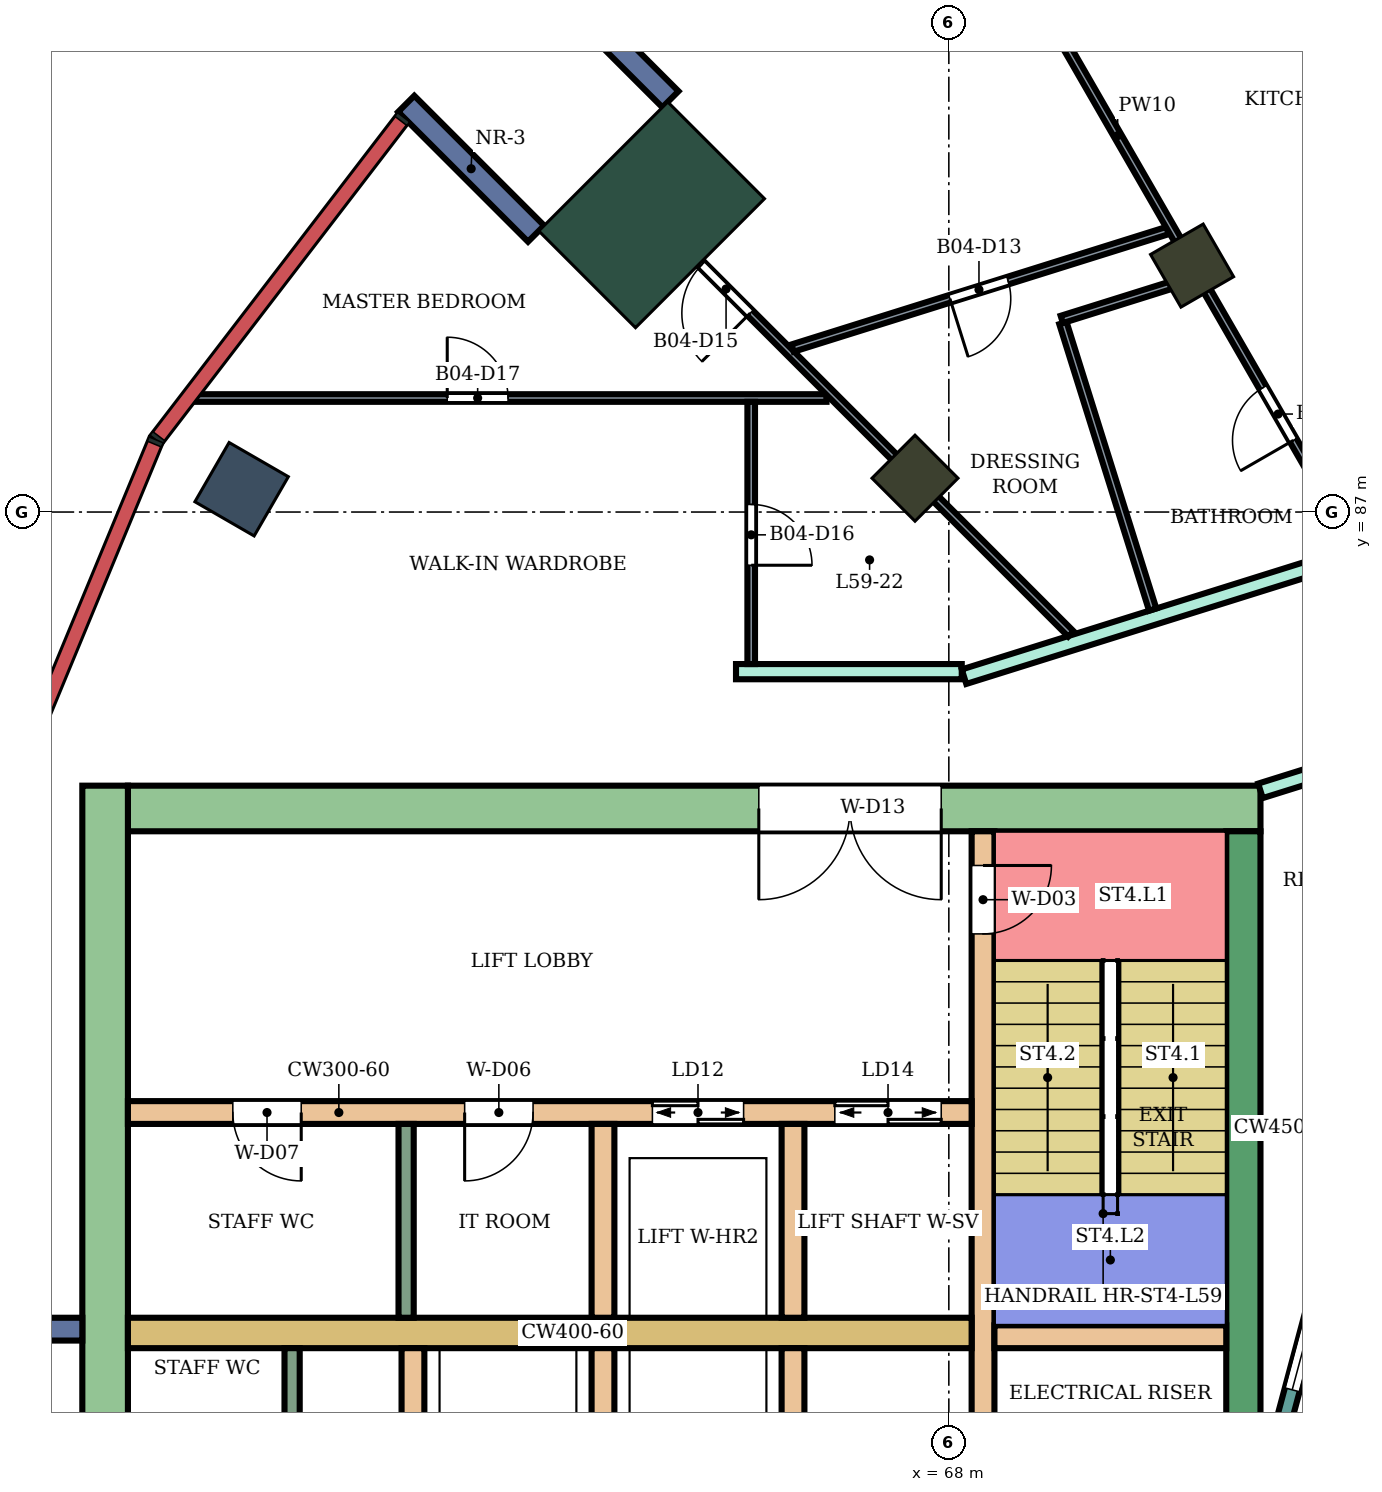
"""IFC4 building model, lengths in metres.
Left out: names, types, materials, properties, quantities, classifications, styles, units other than length and angle.
Written with IfcOpenShell. Run it as: python <this file> out.ifc"""

import sys

from ifc_helpers import new_model, si_unit, direction, frame, frame_2d, origin, origin_2d, place, context, subcontext, project, spatial, rectangle, extrude, element, fill, save


model = new_model("IFC4")
c1 = context("Model", 3, precision=1e-05, world=origin(), true_north=direction((0.0, 1.0)))
c2 = subcontext(c1, "Body", "Model", "MODEL_VIEW")
j1 = project(units=[si_unit("LENGTHUNIT", "METRE"), si_unit("PLANEANGLEUNIT", "RADIAN")], contexts=[c1])
p1 = place(None, origin())
s1 = spatial("IfcSite", under=j1, at=p1, CompositionType="ELEMENT")
p2 = place(p1, origin())
s2 = spatial("IfcBuilding", under=s1, at=p2, CompositionType="ELEMENT")
p3 = place(p2, frame((0.0, 0.0, 258.3)))
s3 = spatial("IfcBuildingStorey", under=s2, at=p3, CompositionType="ELEMENT", Elevation=258.3)
p4 = place(p3, frame((58.696, 87.3, 0.0), z_axis=(0.0, 0.0, 1.0), x_axis=(-0.866025403784, 0.5, 0.0)))
e1 = element("IfcColumn", 1, at=p4, inside=s3, PredefinedType="COLUMN", context=c2, shape_type="SweptSolid", body=[
    extrude(rectangle(XDim=0.9, YDim=0.9, at=origin_2d()), origin(), (0.0, 0.0, 1.0), 4.2),
])
for number, where, z_axis, x_axis in (
    (2, (71.2, 90.242, 0.0), (0.0, 0.0, 1.0), (-0.5, 0.866, 0.0)),
    (3, (67.555, 87.445, 0.0), (0.0, 0.0, 1.0), (-0.707, 0.707, 0.0)),
):
    element("IfcColumn", number, at=place(p3, frame(where, z_axis=z_axis, x_axis=x_axis)), inside=s3, PredefinedType="COLUMN", context=c2, shape_type="SweptSolid", body=[
        extrude(rectangle(XDim=0.8, YDim=0.8, at=origin_2d()), origin(), (0.0, 0.0, 1.0), 4.2),
    ])
p5 = place(p3, frame((64.09, 90.91, 0.0), z_axis=(0.0, 0.0, 1.0), x_axis=(-0.707106781187, 0.707106781187, 0.0)))
e4 = element("IfcColumn", 4, at=p5, inside=s3, PredefinedType="COLUMN", context=c2, shape_type="SweptSolid", body=[
    extrude(rectangle(XDim=1.8, YDim=2.4, at=origin_2d()), origin(), (0.0, 0.0, 1.0), 4.2),
])
p6 = place(p3, frame((72.1, 83.1, 0.0), z_axis=(0.0, 0.0, 1.0), x_axis=(-1.0, 0.0, 0.0)))
e5 = element("IfcWall", 5, at=p6, inside=s3, PredefinedType="SHEAR", context=c2, shape_type="SweptSolid", body=[
    extrude(rectangle(XDim=14.9, YDim=0.6, at=frame_2d((7.45, 0.0))), origin(), (0.0, 0.0, 1.0), 3.88),
])
p7 = place(p6, frame((4.2, 0.0, 0.0)))
e6 = element("IfcOpeningElement", 6, at=p7, cuts=e5, PredefinedType="OPENING", context=c2, shape_type="SweptSolid", body=[
    extrude(rectangle(XDim=2.4, YDim=2.4, at=frame_2d((1.2, 1.2))), frame((0.0, 0.31, 0.0), z_axis=(0.0, -1.0, 0.0), x_axis=(1.0, 0.0, 0.0)), (0.0, 0.0, 1.0), 0.62),
])
p8 = place(p3, frame((71.875, 82.8, 0.0), z_axis=(0.0, 0.0, 1.0), x_axis=(0.0, -1.0, 0.0)))
e7 = element("IfcWall", 7, at=p8, inside=s3, PredefinedType="SHEAR", context=c2, shape_type="SweptSolid", body=[
    extrude(rectangle(XDim=7.8, YDim=0.45, at=frame_2d((3.9, 0.0))), origin(), (0.0, 0.0, 1.0), 3.88),
])
p9 = place(p3, frame((56.9, 83.4, 0.0), z_axis=(0.0, 0.0, 1.0), x_axis=(0.0, -1.0, 0.0)))
e8 = element("IfcWall", 8, at=p9, inside=s3, PredefinedType="SHEAR", context=c2, shape_type="SweptSolid", body=[
    extrude(rectangle(XDim=16.8, YDim=0.6, at=frame_2d((8.4, 0.0))), origin(), (0.0, 0.0, 1.0), 3.88),
])
p10 = place(p3, frame((68.45, 82.8, 0.0), z_axis=(0.0, 0.0, 1.0), x_axis=(0.0, -1.0, 0.0)))
e9 = element("IfcWall", 9, at=p10, inside=s3, PredefinedType="SHEAR", context=c2, shape_type="SweptSolid", body=[
    extrude(rectangle(XDim=7.8, YDim=0.3, at=frame_2d((3.9, 0.0))), origin(), (0.0, 0.0, 1.0), 3.88),
])
p11 = place(p10, frame((0.45, 0.0, 0.0)))
e10 = element("IfcOpeningElement", 10, at=p11, cuts=e9, PredefinedType="OPENING", context=c2, shape_type="SweptSolid", body=[
    extrude(rectangle(XDim=0.9, YDim=2.1, at=frame_2d((0.45, 1.05))), frame((0.0, 0.16, 0.0), z_axis=(0.0, -1.0, 0.0), x_axis=(1.0, 0.0, 0.0)), (0.0, 0.0, 1.0), 0.32),
])
p12 = place(p3, frame((71.65, 76.15, 0.0), z_axis=(0.0, 0.0, 1.0), x_axis=(-1.0, 0.0, 0.0)))
e11 = element("IfcWall", 11, at=p12, inside=s3, PredefinedType="SHEAR", context=c2, shape_type="SweptSolid", body=[
    extrude(rectangle(XDim=3.05, YDim=0.3, at=frame_2d((1.525, 0.0))), origin(), (0.0, 0.0, 1.0), 3.88),
])
p13 = place(p3, frame((68.3, 76.2, 0.0), z_axis=(0.0, 0.0, 1.0), x_axis=(-1.0, 0.0, 0.0)))
e12 = element("IfcWall", 12, at=p13, inside=s3, PredefinedType="SHEAR", context=c2, shape_type="SweptSolid", body=[
    extrude(rectangle(XDim=11.1, YDim=0.4, at=frame_2d((5.55, 0.0))), origin(), (0.0, 0.0, 1.0), 3.88),
])
p14 = place(p3, frame((68.3, 79.1, 0.0), z_axis=(0.0, 0.0, 1.0), x_axis=(-1.0, 0.0, 0.0)))
e13 = element("IfcWall", 13, at=p14, inside=s3, PredefinedType="SHEAR", context=c2, shape_type="SweptSolid", body=[
    extrude(rectangle(XDim=11.1, YDim=0.3, at=frame_2d((5.55, 0.0))), origin(), (0.0, 0.0, 1.0), 3.88),
])
p15 = place(p14, frame((0.4, 0.0, 0.0)))
e14 = element("IfcOpeningElement", 14, at=p15, cuts=e13, PredefinedType="OPENING", context=c2, shape_type="SweptSolid", body=[
    extrude(rectangle(XDim=1.4, YDim=2.1, at=frame_2d((0.7, 1.05))), frame((0.0, 0.16, 0.0), z_axis=(0.0, -1.0, 0.0), x_axis=(1.0, 0.0, 0.0)), (0.0, 0.0, 1.0), 0.32),
])
p16 = place(p14, frame((3.0, 0.0, 0.0)))
e15 = element("IfcOpeningElement", 15, at=p16, cuts=e13, PredefinedType="OPENING", context=c2, shape_type="SweptSolid", body=[
    extrude(rectangle(XDim=1.2, YDim=2.1, at=frame_2d((0.6, 1.05))), frame((0.0, 0.16, 0.0), z_axis=(0.0, -1.0, 0.0), x_axis=(1.0, 0.0, 0.0)), (0.0, 0.0, 1.0), 0.32),
])
p17 = place(p14, frame((5.77, 0.0, 0.0)))
e16 = element("IfcOpeningElement", 16, at=p17, cuts=e13, PredefinedType="OPENING", context=c2, shape_type="SweptSolid", body=[
    extrude(rectangle(XDim=0.9, YDim=2.1, at=frame_2d((0.45, 1.05))), frame((0.0, 0.16, 0.0), z_axis=(0.0, -1.0, 0.0), x_axis=(1.0, 0.0, 0.0)), (0.0, 0.0, 1.0), 0.32),
])
p18 = place(p14, frame((8.82, 0.0, 0.0)))
e17 = element("IfcOpeningElement", 17, at=p18, cuts=e13, PredefinedType="OPENING", context=c2, shape_type="SweptSolid", body=[
    extrude(rectangle(XDim=0.9, YDim=2.1, at=frame_2d((0.45, 1.05))), frame((0.0, 0.16, 0.0), z_axis=(0.0, -1.0, 0.0), x_axis=(1.0, 0.0, 0.0)), (0.0, 0.0, 1.0), 0.32),
])
for number, where, z_axis, x_axis in (
    (18, (65.95, 76.0, 0.0), (0.0, 0.0, 1.0), (0.0, -1.0, 0.0)),
    (19, (63.45, 76.0, 0.0), (0.0, 0.0, 1.0), (0.0, -1.0, 0.0)),
    (20, (60.95, 76.0, 0.0), (0.0, 0.0, 1.0), (0.0, -1.0, 0.0)),
    (21, (65.95, 78.95, 0.0), (0.0, 0.0, 1.0), (0.0, -1.0, 0.0)),
    (22, (63.45, 78.95, 0.0), (0.0, 0.0, 1.0), (0.0, -1.0, 0.0)),
):
    element("IfcWall", number, at=place(p3, frame(where, z_axis=z_axis, x_axis=x_axis)), inside=s3, PredefinedType="SHEAR", context=c2, shape_type="SweptSolid", body=[
        extrude(rectangle(XDim=2.55, YDim=0.3, at=frame_2d((1.275, 0.0))), origin(), (0.0, 0.0, 1.0), 3.88),
    ])
for number, where, z_axis, x_axis in (
    (23, (64.338, 92.43, 0.0), (0.0, 0.0, 1.0), (-0.707, 0.707, 0.0)),
    (24, (62.57, 90.662, 0.0), (0.0, 0.0, 1.0), (-0.707, 0.707, 0.0)),
    (25, (56.6, 76.25, 0.0), (0.0, 0.0, 1.0), (-1.0, 0.0, 0.0)),
):
    element("IfcWall", number, at=place(p3, frame(where, z_axis=z_axis, x_axis=x_axis)), inside=s3, PredefinedType="NOTDEFINED", context=c2, shape_type="SweptSolid", body=[
        extrude(rectangle(XDim=2.416, YDim=0.3, at=frame_2d((1.208, 0.0))), origin(), (0.0, 0.0, 1.0), 4.2),
    ])
p19 = place(p3, frame((73.415, 78.802, 0.0), z_axis=(0.0, 0.0, 1.0), x_axis=(-0.258789828301, -0.965933654434, 0.0)))
e26 = element("IfcWall", 26, at=p19, inside=s3, PredefinedType="NOTDEFINED", context=c2, shape_type="SweptSolid", body=[
    extrude(rectangle(XDim=3.936, YDim=0.2, at=frame_2d((1.968, 0.0))), origin(), (0.0, 0.0, 1.0), 4.2),
])
p20 = place(p19, frame((0.468, 0.0, 0.9)))
e27 = element("IfcOpeningElement", 27, at=p20, cuts=e26, PredefinedType="OPENING", context=c2, shape_type="SweptSolid", body=[
    extrude(rectangle(XDim=3.0, YDim=2.3, at=frame_2d((1.5, 1.15))), frame((0.0, 0.11, 0.0), z_axis=(0.0, -1.0, 0.0), x_axis=(1.0, 0.0, 0.0)), (0.0, 0.0, 1.0), 0.22),
])
p21 = place(p3, frame((65.2, 84.9, 0.0), z_axis=(0.0, 0.0, 1.0), x_axis=(1.0, 0.0, 0.0)))
e28 = element("IfcWall", 28, at=p21, inside=s3, PredefinedType="PARTITIONING", context=c2, shape_type="SweptSolid", body=[
    extrude(rectangle(XDim=2.97, YDim=0.2, at=frame_2d((1.485, 0.0))), origin(), (0.0, 0.0, 1.0), 3.75),
])
p22 = place(p3, frame((68.2, 84.834, 0.0), z_axis=(0.0, 0.0, 1.0), x_axis=(0.954260265251, 0.298977166624, 0.0)))
e29 = element("IfcWall", 29, at=p22, inside=s3, PredefinedType="PARTITIONING", context=c2, shape_type="SweptSolid", body=[
    extrude(rectangle(XDim=5.741, YDim=0.2, at=frame_2d((2.87, 0.0))), origin(), (0.0, 0.0, 1.0), 3.75),
])
p23 = place(p3, frame((72.1, 83.332, 0.0), z_axis=(0.0, 0.0, 1.0), x_axis=(0.954233106619, 0.299063836383, 0.0)))
e30 = element("IfcWall", 30, at=p23, inside=s3, PredefinedType="PARTITIONING", context=c2, shape_type="SweptSolid", body=[
    extrude(rectangle(XDim=2.414, YDim=0.2, at=frame_2d((1.207, 0.0))), origin(), (0.0, 0.0, 1.0), 3.75),
])
p24 = place(p23, frame((0.762, 0.0, 0.0)))
e31 = element("IfcOpeningElement", 31, at=p24, cuts=e30, PredefinedType="OPENING", context=c2, shape_type="SweptSolid", body=[
    extrude(rectangle(XDim=0.9, YDim=2.1, at=frame_2d((0.45, 1.05))), frame((0.0, 0.11, 0.0), z_axis=(0.0, -1.0, 0.0), x_axis=(1.0, 0.0, 0.0)), (0.0, 0.0, 1.0), 0.22),
])
p25 = place(p3, frame((58.072, 88.5, 0.0), z_axis=(0.0, 0.0, 1.0), x_axis=(1.0, 0.0, 0.0)))
e32 = element("IfcWall", 32, at=p25, inside=s3, PredefinedType="PARTITIONING", context=c2, shape_type="SweptSolid", body=[
    extrude(rectangle(XDim=8.319, YDim=0.1, at=frame_2d((4.159, 0.0))), origin(), (0.0, 0.0, 1.0), 3.75),
])
p26 = place(p25, frame((3.329, 0.0, 0.0)))
e33 = element("IfcOpeningElement", 33, at=p26, cuts=e32, PredefinedType="OPENING", context=c2, shape_type="SweptSolid", body=[
    extrude(rectangle(XDim=0.8, YDim=2.1, at=frame_2d((0.4, 1.05))), frame((0.0, 0.06, 0.0), z_axis=(0.0, -1.0, 0.0), x_axis=(1.0, 0.0, 0.0)), (0.0, 0.0, 1.0), 0.12),
])
p27 = place(p3, frame((63.597, 91.407, 0.0), z_axis=(0.0, 0.0, 1.0), x_axis=(0.70700623685, -0.707207311228, 0.0)))
e34 = element("IfcWall", 34, at=p27, inside=s3, PredefinedType="PARTITIONING", context=c2, shape_type="SweptSolid", body=[
    extrude(rectangle(XDim=8.499, YDim=0.1, at=frame_2d((4.25, 0.0))), origin(), (0.0, 0.0, 1.0), 3.75),
])
p28 = place(p27, frame((1.632, 0.0, 0.0)))
e35 = element("IfcOpeningElement", 35, at=p28, cuts=e34, PredefinedType="OPENING", context=c2, shape_type="SweptSolid", body=[
    extrude(rectangle(XDim=0.9, YDim=2.1, at=frame_2d((0.45, 1.05))), frame((0.0, 0.06, 0.0), z_axis=(0.0, -1.0, 0.0), x_axis=(1.0, 0.0, 0.0)), (0.0, 0.0, 1.0), 0.12),
])
p29 = place(p3, frame((65.4, 85.0, 0.0), z_axis=(0.0, 0.0, 1.0), x_axis=(0.0, 1.0, 0.0)))
e36 = element("IfcWall", 36, at=p29, inside=s3, PredefinedType="PARTITIONING", context=c2, shape_type="SweptSolid", body=[
    extrude(rectangle(XDim=3.45, YDim=0.1, at=frame_2d((1.725, 0.0))), origin(), (0.0, 0.0, 1.0), 3.75),
])
p30 = place(p29, frame((1.3, 0.0, 0.0)))
e37 = element("IfcOpeningElement", 37, at=p30, cuts=e36, PredefinedType="OPENING", context=c2, shape_type="SweptSolid", body=[
    extrude(rectangle(XDim=0.8, YDim=2.1, at=frame_2d((0.4, 1.05))), frame((0.0, 0.06, 0.0), z_axis=(0.0, -1.0, 0.0), x_axis=(1.0, 0.0, 0.0)), (0.0, 0.0, 1.0), 0.12),
])
p31 = place(p3, frame((65.944, 89.157, 0.0), z_axis=(0.0, 0.0, 1.0), x_axis=(0.954238484697, 0.299046675828, 0.0)))
e38 = element("IfcWall", 38, at=p31, inside=s3, PredefinedType="PARTITIONING", context=c2, shape_type="SweptSolid", body=[
    extrude(rectangle(XDim=5.169, YDim=0.1, at=frame_2d((2.585, 0.0))), origin(), (0.0, 0.0, 1.0), 3.75),
])
p32 = place(p31, frame((2.17, 0.0, 0.0)))
e39 = element("IfcOpeningElement", 39, at=p32, cuts=e38, PredefinedType="OPENING", context=c2, shape_type="SweptSolid", body=[
    extrude(rectangle(XDim=0.8, YDim=2.1, at=frame_2d((0.4, 1.05))), frame((0.0, 0.06, 0.0), z_axis=(0.0, -1.0, 0.0), x_axis=(1.0, 0.0, 0.0)), (0.0, 0.0, 1.0), 0.12),
])
p33 = place(p3, frame((67.111, 97.347, 0.0), z_axis=(0.0, 0.0, 1.0), x_axis=(0.499428303955, -0.866355221147, 0.0)))
e40 = element("IfcWall", 40, at=p33, inside=s3, PredefinedType="PARTITIONING", context=c2, shape_type="SweptSolid", body=[
    extrude(rectangle(XDim=12.456, YDim=0.1, at=frame_2d((6.228, 0.0))), origin(), (0.0, 0.0, 1.0), 3.75),
])
p34 = place(p33, frame((2.538, 0.0, 0.0)))
e41 = element("IfcOpeningElement", 41, at=p34, cuts=e40, PredefinedType="OPENING", context=c2, shape_type="SweptSolid", body=[
    extrude(rectangle(XDim=0.9, YDim=2.1, at=frame_2d((0.45, 1.05))), frame((0.0, 0.06, 0.0), z_axis=(0.0, -1.0, 0.0), x_axis=(1.0, 0.0, 0.0)), (0.0, 0.0, 1.0), 0.12),
])
p35 = place(p33, frame((10.055, 0.0, 0.0)))
e42 = element("IfcOpeningElement", 42, at=p35, cuts=e40, PredefinedType="OPENING", context=c2, shape_type="SweptSolid", body=[
    extrude(rectangle(XDim=0.8, YDim=2.1, at=frame_2d((0.4, 1.05))), frame((0.0, 0.06, 0.0), z_axis=(0.0, -1.0, 0.0), x_axis=(1.0, 0.0, 0.0)), (0.0, 0.0, 1.0), 0.12),
])
p36 = place(p3, frame((69.501, 89.486, 0.0), z_axis=(0.0, 0.0, 1.0), x_axis=(0.298971609069, -0.954262006459, 0.0)))
e43 = element("IfcWall", 43, at=p36, inside=s3, PredefinedType="PARTITIONING", context=c2, shape_type="SweptSolid", body=[
    extrude(rectangle(XDim=3.951, YDim=0.1, at=frame_2d((1.975, 0.0))), origin(), (0.0, 0.0, 1.0), 3.75),
])
p37 = place(p3, frame((69.486, 89.534, 0.0), z_axis=(0.0, 0.0, 1.0), x_axis=(0.954254575134, 0.298995327449, 0.0)))
e44 = element("IfcWall", 44, at=p37, inside=s3, PredefinedType="PARTITIONING", context=c2, shape_type="SweptSolid", body=[
    extrude(rectangle(XDim=1.833, YDim=0.1, at=frame_2d((0.917, 0.0))), origin(), (0.0, 0.0, 1.0), 3.75),
])
for number, where, z_axis, x_axis in (
    (45, (59.36, 76.0, 0.0), (0.0, 0.0, 1.0), (0.0, -1.0, 0.0)),
    (46, (60.86, 78.95, 0.0), (0.0, 0.0, 1.0), (0.0, -1.0, 0.0)),
):
    element("IfcWall", number, at=place(p3, frame(where, z_axis=z_axis, x_axis=x_axis)), inside=s3, PredefinedType="PARTITIONING", context=c2, shape_type="SweptSolid", body=[
        extrude(rectangle(XDim=2.55, YDim=0.2, at=frame_2d((1.275, 0.0))), origin(), (0.0, 0.0, 1.0), 3.88),
    ])
p38 = place(p20, origin())
e47 = element("IfcWindow", 47, at=p38, inside=s3, PartitioningType="SINGLE_PANEL", PredefinedType="WINDOW", context=c2, shape_type="SweptSolid", body=[
    extrude(rectangle(XDim=3.0, YDim=2.3, at=frame_2d((1.5, 1.15))), frame((0.0, 0.03, 0.0), z_axis=(0.0, -1.0, 0.0), x_axis=(1.0, 0.0, 0.0)), (0.0, 0.0, 1.0), 0.06),
])
fill(e27, e47)
p39 = place(p32, frame((0.8, 0.0, 0.0), z_axis=(0.0, 0.0, 1.0), x_axis=(-1.0, 0.0, 0.0)))
e48 = element("IfcDoor", 48, at=p39, inside=s3, OperationType="SINGLE_SWING_RIGHT", PredefinedType="DOOR", context=c2, shape_type="SweptSolid", body=[
    extrude(rectangle(XDim=0.8, YDim=2.1, at=frame_2d((0.4, 1.05))), frame((0.0, 0.025, 0.0), z_axis=(0.0, -1.0, 0.0), x_axis=(1.0, 0.0, 0.0)), (0.0, 0.0, 1.0), 0.05),
])
fill(e39, e48)
p40 = place(p35, frame((0.8, 0.0, 0.0), z_axis=(0.0, 0.0, 1.0), x_axis=(-1.0, 0.0, 0.0)))
e49 = element("IfcDoor", 49, at=p40, inside=s3, OperationType="SINGLE_SWING_LEFT", PredefinedType="DOOR", context=c2, shape_type="SweptSolid", body=[
    extrude(rectangle(XDim=0.8, YDim=2.1, at=frame_2d((0.4, 1.05))), frame((0.0, 0.025, 0.0), z_axis=(0.0, -1.0, 0.0), x_axis=(1.0, 0.0, 0.0)), (0.0, 0.0, 1.0), 0.05),
])
fill(e42, e49)
p41 = place(p28, frame((0.9, 0.0, 0.0), z_axis=(0.0, 0.0, 1.0), x_axis=(-1.0, 0.0, 0.0)))
e50 = element("IfcDoor", 50, at=p41, inside=s3, OperationType="SINGLE_SWING_LEFT", PredefinedType="DOOR", context=c2, shape_type="SweptSolid", body=[
    extrude(rectangle(XDim=0.9, YDim=2.1, at=frame_2d((0.45, 1.05))), frame((0.0, 0.025, 0.0), z_axis=(0.0, -1.0, 0.0), x_axis=(1.0, 0.0, 0.0)), (0.0, 0.0, 1.0), 0.05),
])
fill(e35, e50)
p42 = place(p30, frame((0.8, 0.0, 0.0), z_axis=(0.0, 0.0, 1.0), x_axis=(-1.0, 0.0, 0.0)))
e51 = element("IfcDoor", 51, at=p42, inside=s3, OperationType="SINGLE_SWING_RIGHT", PredefinedType="DOOR", context=c2, shape_type="SweptSolid", body=[
    extrude(rectangle(XDim=0.8, YDim=2.1, at=frame_2d((0.4, 1.05))), frame((0.0, 0.025, 0.0), z_axis=(0.0, -1.0, 0.0), x_axis=(1.0, 0.0, 0.0)), (0.0, 0.0, 1.0), 0.05),
])
fill(e37, e51)
p43 = place(p26, origin())
e52 = element("IfcDoor", 52, at=p43, inside=s3, OperationType="SINGLE_SWING_LEFT", PredefinedType="DOOR", context=c2, shape_type="SweptSolid", body=[
    extrude(rectangle(XDim=0.8, YDim=2.1, at=frame_2d((0.4, 1.05))), frame((0.0, 0.025, 0.0), z_axis=(0.0, -1.0, 0.0), x_axis=(1.0, 0.0, 0.0)), (0.0, 0.0, 1.0), 0.05),
])
fill(e33, e52)
p44 = place(p11, origin())
e53 = element("IfcDoor", 53, at=p44, inside=s3, OperationType="SINGLE_SWING_LEFT", PredefinedType="DOOR", context=c2, shape_type="SweptSolid", body=[
    extrude(rectangle(XDim=0.9, YDim=2.1, at=frame_2d((0.45, 1.05))), frame((0.0, 0.025, 0.0), z_axis=(0.0, -1.0, 0.0), x_axis=(1.0, 0.0, 0.0)), (0.0, 0.0, 1.0), 0.05),
])
fill(e10, e53)
p45 = place(p15, origin())
e54 = element("IfcDoor", 54, at=p45, inside=s3, OperationType="DOUBLE_DOOR_SLIDING", PredefinedType="DOOR", context=c2, shape_type="SweptSolid", body=[
    extrude(rectangle(XDim=1.4, YDim=2.1, at=frame_2d((0.7, 1.05))), frame((0.0, 0.025, 0.0), z_axis=(0.0, -1.0, 0.0), x_axis=(1.0, 0.0, 0.0)), (0.0, 0.0, 1.0), 0.05),
])
fill(e14, e54)
p46 = place(p16, origin())
e55 = element("IfcDoor", 55, at=p46, inside=s3, OperationType="DOUBLE_DOOR_SLIDING", PredefinedType="DOOR", context=c2, shape_type="SweptSolid", body=[
    extrude(rectangle(XDim=1.2, YDim=2.1, at=frame_2d((0.6, 1.05))), frame((0.0, 0.025, 0.0), z_axis=(0.0, -1.0, 0.0), x_axis=(1.0, 0.0, 0.0)), (0.0, 0.0, 1.0), 0.05),
])
fill(e15, e55)
p47 = place(p17, origin())
e56 = element("IfcDoor", 56, at=p47, inside=s3, OperationType="SINGLE_SWING_RIGHT", PredefinedType="DOOR", context=c2, shape_type="SweptSolid", body=[
    extrude(rectangle(XDim=0.9, YDim=2.1, at=frame_2d((0.45, 1.05))), frame((0.0, 0.025, 0.0), z_axis=(0.0, -1.0, 0.0), x_axis=(1.0, 0.0, 0.0)), (0.0, 0.0, 1.0), 0.05),
])
fill(e16, e56)
p48 = place(p18, origin())
e57 = element("IfcDoor", 57, at=p48, inside=s3, OperationType="SINGLE_SWING_LEFT", PredefinedType="DOOR", context=c2, shape_type="SweptSolid", body=[
    extrude(rectangle(XDim=0.9, YDim=2.1, at=frame_2d((0.45, 1.05))), frame((0.0, 0.025, 0.0), z_axis=(0.0, -1.0, 0.0), x_axis=(1.0, 0.0, 0.0)), (0.0, 0.0, 1.0), 0.05),
])
fill(e17, e57)
p49 = place(p7, origin())
e58 = element("IfcDoor", 58, at=p49, inside=s3, OperationType="DOUBLE_DOOR_SINGLE_SWING", PredefinedType="DOOR", context=c2, shape_type="SweptSolid", body=[
    extrude(rectangle(XDim=2.4, YDim=2.4, at=frame_2d((1.2, 1.2))), frame((0.0, 0.025, 0.0), z_axis=(0.0, -1.0, 0.0), x_axis=(1.0, 0.0, 0.0)), (0.0, 0.0, 1.0), 0.05),
])
fill(e6, e58)
save(model, sys.argv[1])
